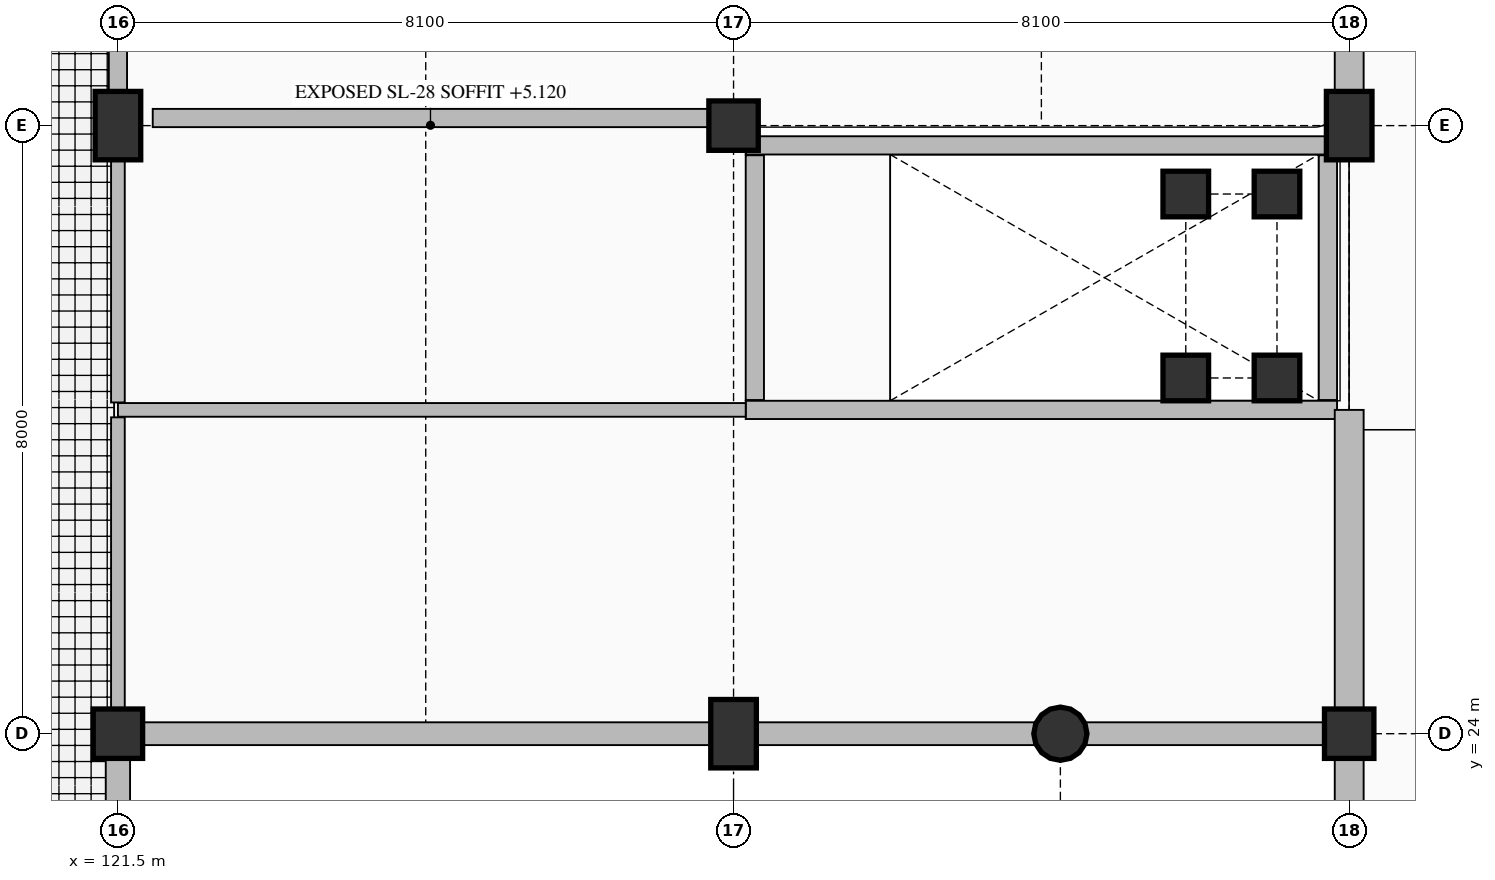
"""IFC4 building model, lengths in metres.
Left out: names, types, materials, properties, quantities, classifications, styles, units other than length and angle.
Written with IfcOpenShell. Run it as: python <this file> out.ifc"""

import sys

from ifc_helpers import new_model, si_unit, direction, frame, frame_2d, origin, origin_2d, place, context, subcontext, project, spatial, rectangle, circle, extrude, element, fill, save


model = new_model("IFC4")
c1 = context("Model", 3, precision=1e-05, world=origin(), true_north=direction((0.0, 1.0)))
c2 = subcontext(c1, "Body", "Model", "MODEL_VIEW")
j1 = project(units=[si_unit("LENGTHUNIT", "METRE"), si_unit("PLANEANGLEUNIT", "RADIAN")], contexts=[c1])
p1 = place(None, origin())
s1 = spatial("IfcSite", under=j1, at=p1, CompositionType="ELEMENT")
p2 = place(p1, origin())
s2 = spatial("IfcBuilding", under=s1, at=p2, CompositionType="ELEMENT")
p3 = place(p2, origin())
s3 = spatial("IfcBuildingStorey", under=s2, at=p3, CompositionType="ELEMENT", Elevation=0.0)
p4 = place(p3, frame((121.5, 24.0, 0.0), z_axis=(0.0, 0.0, 1.0), x_axis=(1.0, 0.0, 0.0)))
e1 = element("IfcColumn", 1, at=p4, inside=s3, PredefinedType="COLUMN", context=c2, shape_type="SweptSolid", body=[
    extrude(rectangle(XDim=0.65, YDim=0.65, at=origin_2d()), origin(), (0.0, 0.0, 1.0), 5.4),
])
for number, where, z_axis, x_axis in (
    (2, (121.5, 32.0, 0.0), (0.0, 0.0, 1.0), (1.0, 0.0, 0.0)),
    (3, (129.6, 24.0, 0.0), (0.0, 0.0, 1.0), (1.0, 0.0, 0.0)),
):
    element("IfcColumn", number, at=place(p3, frame(where, z_axis=z_axis, x_axis=x_axis)), inside=s3, PredefinedType="COLUMN", context=c2, shape_type="SweptSolid", body=[
        extrude(rectangle(XDim=0.6, YDim=0.9, at=origin_2d()), origin(), (0.0, 0.0, 1.0), 5.4),
    ])
p5 = place(p3, frame((129.6, 32.0, 0.0), z_axis=(0.0, 0.0, 1.0), x_axis=(1.0, 0.0, 0.0)))
e4 = element("IfcColumn", 4, at=p5, inside=s3, PredefinedType="COLUMN", context=c2, shape_type="SweptSolid", body=[
    extrude(rectangle(XDim=0.65, YDim=0.65, at=origin_2d()), origin(), (0.0, 0.0, 1.0), 5.4),
])
for number, where, z_axis, x_axis in (
    (5, (135.55, 28.68, 0.0), (0.0, 0.0, 1.0), (1.0, 0.0, 0.0)),
    (6, (135.55, 31.1, 0.0), (0.0, 0.0, 1.0), (1.0, 0.0, 0.0)),
    (7, (136.75, 28.68, 0.0), (0.0, 0.0, 1.0), (1.0, 0.0, 0.0)),
    (8, (136.75, 31.1, 0.0), (0.0, 0.0, 1.0), (1.0, 0.0, 0.0)),
):
    element("IfcColumn", number, at=place(p3, frame(where, z_axis=z_axis, x_axis=x_axis)), inside=s3, PredefinedType="COLUMN", context=c2, shape_type="SweptSolid", body=[
        extrude(rectangle(XDim=0.6, YDim=0.6, at=origin_2d()), origin(), (0.0, 0.0, 1.0), 5.4),
    ])
p6 = place(p3, frame((137.7, 24.0, 0.0), z_axis=(0.0, 0.0, 1.0), x_axis=(1.0, 0.0, 0.0)))
e9 = element("IfcColumn", 9, at=p6, inside=s3, PredefinedType="COLUMN", context=c2, shape_type="SweptSolid", body=[
    extrude(rectangle(XDim=0.65, YDim=0.65, at=origin_2d()), origin(), (0.0, 0.0, 1.0), 5.4),
])
p7 = place(p3, frame((137.7, 32.0, 0.0), z_axis=(0.0, 0.0, 1.0), x_axis=(1.0, 0.0, 0.0)))
e10 = element("IfcColumn", 10, at=p7, inside=s3, PredefinedType="COLUMN", context=c2, shape_type="SweptSolid", body=[
    extrude(rectangle(XDim=0.6, YDim=0.9, at=origin_2d()), origin(), (0.0, 0.0, 1.0), 5.4),
])
p8 = place(p3, frame((133.9, 24.0, 0.0), z_axis=(0.0, 0.0, 1.0), x_axis=(1.0, 0.0, 0.0)))
e11 = element("IfcColumn", 11, at=p8, inside=s3, PredefinedType="COLUMN", context=c2, shape_type="SweptSolid", body=[
    extrude(circle(Radius=0.35, at=origin_2d()), origin(), (0.0, 0.0, 1.0), 6.3),
])
p9 = place(p3, frame((121.5, 22.18, 0.0), z_axis=(0.0, 0.0, 1.0), x_axis=(0.0, 1.0, 0.0)))
e12 = element("IfcWall", 12, at=p9, inside=s3, PredefinedType="SOLIDWALL", context=c2, shape_type="SweptSolid", body=[
    extrude(rectangle(XDim=1.82, YDim=0.32, at=frame_2d((0.91, 0.0))), origin(), (0.0, 0.0, 1.0), 4.512),
])
p10 = place(p3, frame((121.5, 24.0, 0.0), z_axis=(0.0, 0.0, 1.0), x_axis=(1.0, 0.0, 0.0)))
e13 = element("IfcWall", 13, at=p10, inside=s3, PredefinedType="SOLIDWALL", context=c2, shape_type="SweptSolid", body=[
    extrude(rectangle(XDim=16.2, YDim=0.3, at=frame_2d((8.1, 0.0))), origin(), (0.0, 0.0, 1.0), 4.412),
])
p11 = place(p10, frame((3.586, 0.0, 0.0)))
e14 = element("IfcOpeningElement", 14, at=p11, cuts=e13, PredefinedType="OPENING", context=c2, shape_type="SweptSolid", body=[
    extrude(rectangle(XDim=1.9, YDim=2.4, at=frame_2d((0.95, 1.2))), frame((0.0, 0.16, 0.0), z_axis=(0.0, -1.0, 0.0), x_axis=(1.0, 0.0, 0.0)), (0.0, 0.0, 1.0), 0.32),
])
p12 = place(p3, frame((137.7, 24.0, 0.0), z_axis=(0.0, 0.0, 1.0), x_axis=(0.0, -1.0, 0.0)))
e15 = element("IfcWall", 15, at=p12, inside=s3, PredefinedType="SOLIDWALL", context=c2, shape_type="SweptSolid", body=[
    extrude(rectangle(XDim=12.0, YDim=0.38, at=frame_2d((6.0, 0.0))), origin(), (0.0, 0.0, 1.0), 4.512),
])
p13 = place(p3, frame((129.76, 28.26, 0.0), z_axis=(0.0, 0.0, 1.0), x_axis=(1.0, 0.0, 0.0)))
e16 = element("IfcWall", 16, at=p13, inside=s3, PredefinedType="PARTITIONING", context=c2, shape_type="SweptSolid", body=[
    extrude(rectangle(XDim=7.78, YDim=0.24, at=frame_2d((3.89, 0.0))), origin(), (0.0, 0.0, 1.0), 5.12),
])
p14 = place(p13, frame((0.54, 0.0, 0.0)))
e17 = element("IfcOpeningElement", 17, at=p14, cuts=e16, PredefinedType="OPENING", context=c2, shape_type="SweptSolid", body=[
    extrude(rectangle(XDim=1.1, YDim=2.2, at=frame_2d((0.55, 1.1))), frame((0.0, 0.13, 0.0), z_axis=(0.0, -1.0, 0.0), x_axis=(1.0, 0.0, 0.0)), (0.0, 0.0, 1.0), 0.26),
])
p15 = place(p3, frame((129.76, 31.74, 0.0), z_axis=(0.0, 0.0, 1.0), x_axis=(1.0, 0.0, 0.0)))
e18 = element("IfcWall", 18, at=p15, inside=s3, PredefinedType="PARTITIONING", context=c2, shape_type="SweptSolid", body=[
    extrude(rectangle(XDim=7.78, YDim=0.24, at=frame_2d((3.89, 0.0))), origin(), (0.0, 0.0, 1.0), 4.412),
])
for number, where, z_axis, x_axis in (
    (19, (129.88, 28.39, 0.0), (0.0, 0.0, 1.0), (0.0, 1.0, 0.0)),
    (20, (137.42, 28.39, 0.0), (0.0, 0.0, 1.0), (0.0, 1.0, 0.0)),
):
    element("IfcWall", number, at=place(p3, frame(where, z_axis=z_axis, x_axis=x_axis)), inside=s3, PredefinedType="PARTITIONING", context=c2, shape_type="SweptSolid", body=[
        extrude(rectangle(XDim=3.22, YDim=0.24, at=frame_2d((1.61, 0.0))), origin(), (0.0, 0.0, 1.0), 4.512),
    ])
p16 = place(p3, frame((121.5, 28.26, 0.0), z_axis=(0.0, 0.0, 1.0), x_axis=(1.0, 0.0, 0.0)))
e21 = element("IfcWall", 21, at=p16, inside=s3, PredefinedType="PARTITIONING", context=c2, shape_type="SweptSolid", body=[
    extrude(rectangle(XDim=8.26, YDim=0.18, at=frame_2d((4.13, 0.0))), origin(), (0.0, 0.0, 1.0), 5.12),
])
p17 = place(p16, frame((3.58, 0.0, 0.0)))
e22 = element("IfcOpeningElement", 22, at=p17, cuts=e21, PredefinedType="OPENING", context=c2, shape_type="SweptSolid", body=[
    extrude(rectangle(XDim=1.1, YDim=2.2, at=frame_2d((0.55, 1.1))), frame((0.0, 0.1, 0.0), z_axis=(0.0, -1.0, 0.0), x_axis=(1.0, 0.0, 0.0)), (0.0, 0.0, 1.0), 0.2),
])
p18 = place(p3, frame((121.958, 32.1, 0.0), z_axis=(0.0, 0.0, 1.0), x_axis=(1.0, 0.0, 0.0)))
e23 = element("IfcWall", 23, at=p18, inside=s3, PredefinedType="PARTITIONING", context=c2, shape_type="SweptSolid", body=[
    extrude(rectangle(XDim=7.309, YDim=0.24, at=frame_2d((3.655, 0.0))), origin(), (0.0, 0.0, 1.0), 4.462),
])
p19 = place(p18, frame((3.104, 0.0, 0.0)))
e24 = element("IfcOpeningElement", 24, at=p19, cuts=e23, PredefinedType="OPENING", context=c2, shape_type="SweptSolid", body=[
    extrude(rectangle(XDim=1.1, YDim=2.25, at=frame_2d((0.55, 1.125))), frame((0.0, 0.13, 0.0), z_axis=(0.0, -1.0, 0.0), x_axis=(1.0, 0.0, 0.0)), (0.0, 0.0, 1.0), 0.26),
])
p20 = place(p3, frame((121.5, 24.333, 0.0), z_axis=(0.0, 0.0, 1.0), x_axis=(0.0, 1.0, 0.0)))
e25 = element("IfcWall", 25, at=p20, inside=s3, PredefinedType="PARTITIONING", context=c2, shape_type="SweptSolid", body=[
    extrude(rectangle(XDim=3.829, YDim=0.18, at=frame_2d((1.915, 0.0))), origin(), (0.0, 0.0, 1.0), 4.695),
])
p21 = place(p20, frame((1.365, 0.0, 0.0)))
e26 = element("IfcOpeningElement", 26, at=p21, cuts=e25, PredefinedType="OPENING", context=c2, shape_type="SweptSolid", body=[
    extrude(rectangle(XDim=1.1, YDim=2.2, at=frame_2d((0.55, 1.1))), frame((0.0, 0.1, 0.0), z_axis=(0.0, -1.0, 0.0), x_axis=(1.0, 0.0, 0.0)), (0.0, 0.0, 1.0), 0.2),
])
p22 = place(p3, frame((121.5, 28.358, 0.0), z_axis=(0.0, 0.0, 1.0), x_axis=(0.0, 1.0, 0.0)))
e27 = element("IfcWall", 27, at=p22, inside=s3, PredefinedType="PARTITIONING", context=c2, shape_type="SweptSolid", body=[
    extrude(rectangle(XDim=3.184, YDim=0.18, at=frame_2d((1.592, 0.0))), origin(), (0.0, 0.0, 1.0), 4.695),
])
p23 = place(p3, frame((121.5, 32.458, 0.0), z_axis=(0.0, 0.0, 1.0), x_axis=(0.0, 1.0, 0.0)))
e28 = element("IfcWall", 28, at=p23, inside=s3, PredefinedType="PARTITIONING", context=c2, shape_type="SweptSolid", body=[
    extrude(rectangle(XDim=7.209, YDim=0.24, at=frame_2d((3.604, 0.0))), origin(), (0.0, 0.0, 1.0), 4.512),
])
p24 = place(p3, frame((137.7, 24.333, 0.0), z_axis=(0.0, 0.0, 1.0), x_axis=(0.0, 1.0, 0.0)))
e29 = element("IfcWall", 29, at=p24, inside=s3, PredefinedType="SOLIDWALL", context=c2, shape_type="SweptSolid", body=[
    extrude(rectangle(XDim=3.927, YDim=0.38, at=frame_2d((1.963, 0.0))), origin(), (0.0, 0.0, 1.0), 4.512),
])
p25 = place(p24, frame((1.463, 0.0, 0.0)))
e30 = element("IfcOpeningElement", 30, at=p25, cuts=e29, PredefinedType="OPENING", context=c2, shape_type="SweptSolid", body=[
    extrude(rectangle(XDim=1.0, YDim=2.15, at=frame_2d((0.5, 1.075))), frame((0.0, 0.2, 0.0), z_axis=(0.0, -1.0, 0.0), x_axis=(1.0, 0.0, 0.0)), (0.0, 0.0, 1.0), 0.4),
])
p26 = place(p3, frame((137.7, 32.458, 0.0), z_axis=(0.0, 0.0, 1.0), x_axis=(0.0, 1.0, 0.0)))
e31 = element("IfcWall", 31, at=p26, inside=s3, PredefinedType="SOLIDWALL", context=c2, shape_type="SweptSolid", body=[
    extrude(rectangle(XDim=7.209, YDim=0.38, at=frame_2d((3.604, 0.0))), origin(), (0.0, 0.0, 1.0), 4.695),
])
p27 = place(p11, frame((1.9, 0.0, 0.0), z_axis=(0.0, 0.0, 1.0), x_axis=(-1.0, 0.0, 0.0)))
e32 = element("IfcDoor", 32, at=p27, inside=s3, OperationType="DOUBLE_DOOR_SINGLE_SWING", PredefinedType="DOOR", context=c2, shape_type="SweptSolid", body=[
    extrude(rectangle(XDim=1.9, YDim=2.4, at=frame_2d((0.95, 1.2))), frame((0.0, 0.025, 0.0), z_axis=(0.0, -1.0, 0.0), x_axis=(1.0, 0.0, 0.0)), (0.0, 0.0, 1.0), 0.05),
])
fill(e14, e32)
p28 = place(p14, frame((1.1, 0.0, 0.0), z_axis=(0.0, 0.0, 1.0), x_axis=(-1.0, 0.0, 0.0)))
e33 = element("IfcDoor", 33, at=p28, inside=s3, OperationType="SINGLE_SWING_RIGHT", PredefinedType="DOOR", context=c2, shape_type="SweptSolid", body=[
    extrude(rectangle(XDim=1.1, YDim=2.2, at=frame_2d((0.55, 1.1))), frame((0.0, 0.025, 0.0), z_axis=(0.0, -1.0, 0.0), x_axis=(1.0, 0.0, 0.0)), (0.0, 0.0, 1.0), 0.05),
])
fill(e17, e33)
p29 = place(p17, origin())
e34 = element("IfcDoor", 34, at=p29, inside=s3, OperationType="SINGLE_SWING_LEFT", PredefinedType="DOOR", context=c2, shape_type="SweptSolid", body=[
    extrude(rectangle(XDim=1.1, YDim=2.2, at=frame_2d((0.55, 1.1))), frame((0.0, 0.025, 0.0), z_axis=(0.0, -1.0, 0.0), x_axis=(1.0, 0.0, 0.0)), (0.0, 0.0, 1.0), 0.05),
])
fill(e22, e34)
p30 = place(p19, origin())
e35 = element("IfcDoor", 35, at=p30, inside=s3, OperationType="SINGLE_SWING_RIGHT", PredefinedType="DOOR", context=c2, shape_type="SweptSolid", body=[
    extrude(rectangle(XDim=1.1, YDim=2.25, at=frame_2d((0.55, 1.125))), frame((0.0, 0.025, 0.0), z_axis=(0.0, -1.0, 0.0), x_axis=(1.0, 0.0, 0.0)), (0.0, 0.0, 1.0), 0.05),
])
fill(e24, e35)
p31 = place(p21, frame((1.1, 0.0, 0.0), z_axis=(0.0, 0.0, 1.0), x_axis=(-1.0, 0.0, 0.0)))
e36 = element("IfcDoor", 36, at=p31, inside=s3, OperationType="SINGLE_SWING_RIGHT", PredefinedType="DOOR", context=c2, shape_type="SweptSolid", body=[
    extrude(rectangle(XDim=1.1, YDim=2.2, at=frame_2d((0.55, 1.1))), frame((0.0, 0.025, 0.0), z_axis=(0.0, -1.0, 0.0), x_axis=(1.0, 0.0, 0.0)), (0.0, 0.0, 1.0), 0.05),
])
fill(e26, e36)
p32 = place(p25, origin())
e37 = element("IfcDoor", 37, at=p32, inside=s3, OperationType="SINGLE_SWING_LEFT", PredefinedType="DOOR", context=c2, shape_type="SweptSolid", body=[
    extrude(rectangle(XDim=1.0, YDim=2.15, at=frame_2d((0.5, 1.075))), frame((0.0, 0.025, 0.0), z_axis=(0.0, -1.0, 0.0), x_axis=(1.0, 0.0, 0.0)), (0.0, 0.0, 1.0), 0.05),
])
fill(e30, e37)
save(model, sys.argv[1])
